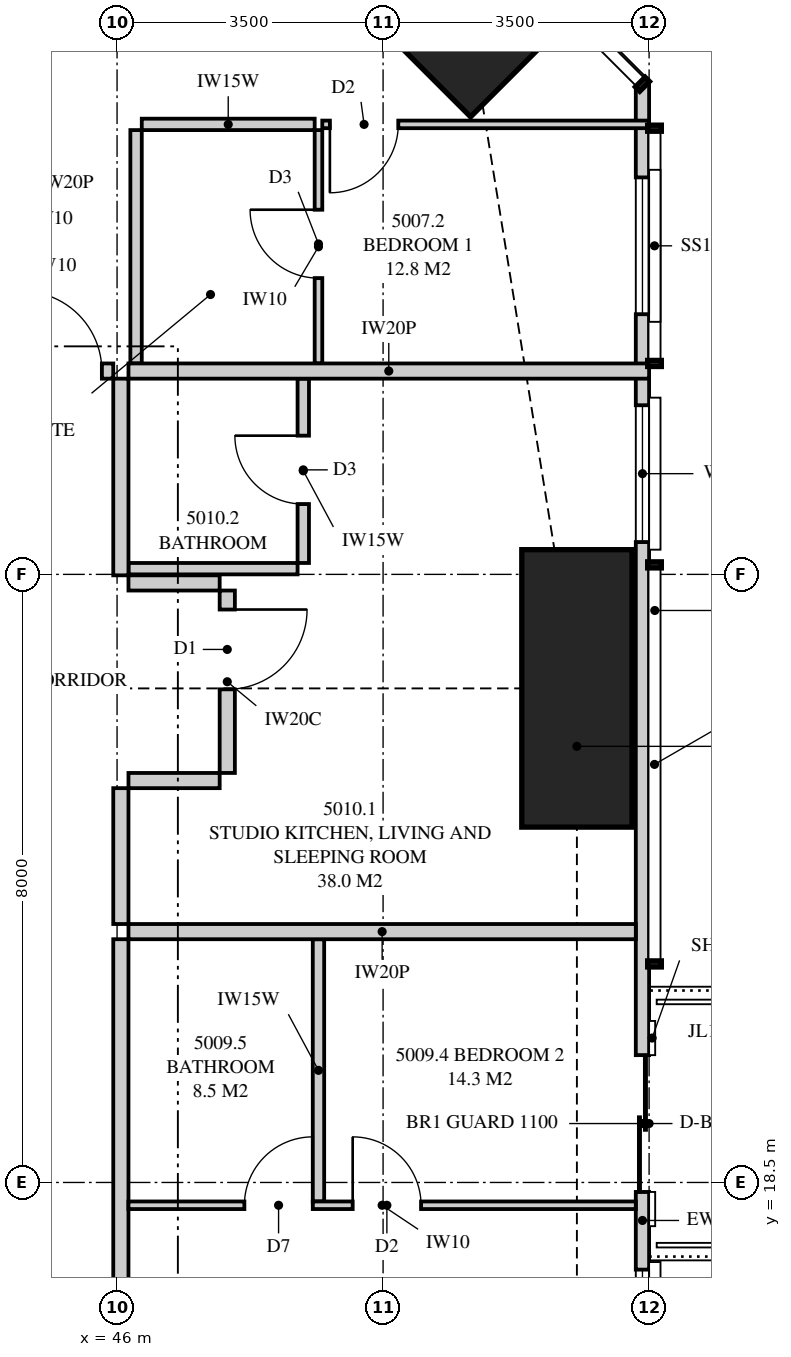
"""IFC4 building model, lengths in metres.
Left out: names, types, materials, properties, quantities, classifications, styles, units other than length and angle.
Written with IfcOpenShell. Run it as: python <this file> out.ifc"""

import sys

from ifc_helpers import new_model, si_unit, direction, frame, frame_2d, origin, origin_2d, place, context, subcontext, project, spatial, polyline, rectangle, outline, extrude, element, fill, save


model = new_model("IFC4")
c1 = context("Model", 3, precision=1e-05, world=origin(), true_north=direction((0.0, 1.0)))
c2 = subcontext(c1, "Body", "Model", "MODEL_VIEW")
j1 = project(units=[si_unit("LENGTHUNIT", "METRE"), si_unit("PLANEANGLEUNIT", "RADIAN")], contexts=[c1])
p1 = place(None, origin())
s1 = spatial("IfcSite", under=j1, at=p1, CompositionType="ELEMENT")
p2 = place(p1, origin())
s2 = spatial("IfcBuilding", under=s1, at=p2, CompositionType="ELEMENT")
p3 = place(p2, frame((0.0, 0.0, 184.5)))
s3 = spatial("IfcBuildingStorey", under=s2, at=p3, CompositionType="ELEMENT", Elevation=184.5)
p4 = place(p3, frame((52.05, 25.0, 0.0), z_axis=(0.0, 0.0, 1.0), x_axis=(1.0, 0.0, 0.0)))
e1 = element("IfcColumn", 1, at=p4, inside=s3, PredefinedType="COLUMN", context=c2, shape_type="SweptSolid", body=[
    extrude(rectangle(XDim=1.45, YDim=3.65, at=origin_2d()), origin(), (0.0, 0.0, 1.0), 3.35),
])
p5 = place(p3, frame((50.652, 33.652, 0.0), z_axis=(0.0, 0.0, 1.0), x_axis=(0.707106781187, 0.707106781187, 0.0)))
e2 = element("IfcColumn", 2, at=p5, inside=s3, PredefinedType="COLUMN", context=c2, shape_type="SweptSolid", body=[
    extrude(rectangle(XDim=1.6, YDim=1.6, at=origin_2d()), origin(), (0.0, 0.0, 1.0), 3.35),
])
p6 = place(p3, frame((52.913, 3.051, 0.0), z_axis=(0.0, 0.0, 1.0), x_axis=(0.0, 1.0, 0.0)))
e3 = element("IfcWall", 3, at=p6, inside=s3, PredefinedType="SOLIDWALL", context=c2, shape_type="SweptSolid", body=[
    extrude(outline(polyline([(0.0, 0.0), (29.897, 0.0), (29.897, 3.11), (22.167, 3.11), (22.167, 2.15), (22.074, 2.15), (22.074, 3.11), (21.949, 3.11), (21.949, 2.15), (9.949, 2.15), (9.949, 3.11), (9.847, 3.11), (9.847, 2.15), (9.706, 2.15), (9.706, 3.11), (0.0, 3.11), (0.0, 0.0)])), frame((0.0, 0.087, 0.0), z_axis=(0.0, -1.0, 0.0), x_axis=(1.0, 0.0, 0.0)), (0.0, 0.0, 1.0), 0.175),
])
p7 = place(p6, frame((1.137, 0.0, 0.4)))
e4 = element("IfcOpeningElement", 4, at=p7, cuts=e3, PredefinedType="OPENING", context=c2, shape_type="SweptSolid", body=[
    extrude(rectangle(XDim=2.4, YDim=1.7, at=frame_2d((1.2, 0.85))), frame((0.0, 0.097, 0.0), z_axis=(0.0, -1.0, 0.0), x_axis=(1.0, 0.0, 0.0)), (0.0, 0.0, 1.0), 0.195),
])
p8 = place(p6, frame((5.674, 0.0, 0.4)))
e5 = element("IfcOpeningElement", 5, at=p8, cuts=e3, PredefinedType="OPENING", context=c2, shape_type="SweptSolid", body=[
    extrude(rectangle(XDim=1.8, YDim=1.7, at=frame_2d((0.9, 0.85))), frame((0.0, 0.097, 0.0), z_axis=(0.0, -1.0, 0.0), x_axis=(1.0, 0.0, 0.0)), (0.0, 0.0, 1.0), 0.195),
])
p9 = place(p6, frame((11.902, 0.0, 0.4)))
e6 = element("IfcOpeningElement", 6, at=p9, cuts=e3, PredefinedType="OPENING", context=c2, shape_type="SweptSolid", body=[
    extrude(rectangle(XDim=2.4, YDim=1.7, at=frame_2d((1.2, 0.85))), frame((0.0, 0.097, 0.0), z_axis=(0.0, -1.0, 0.0), x_axis=(1.0, 0.0, 0.0)), (0.0, 0.0, 1.0), 0.195),
])
p10 = place(p6, frame((15.324, 0.0, 0.0)))
e7 = element("IfcOpeningElement", 7, at=p10, cuts=e3, PredefinedType="OPENING", context=c2, shape_type="SweptSolid", body=[
    extrude(rectangle(XDim=1.8, YDim=2.1, at=frame_2d((0.9, 1.05))), frame((0.0, 0.097, 0.0), z_axis=(0.0, -1.0, 0.0), x_axis=(1.0, 0.0, 0.0)), (0.0, 0.0, 1.0), 0.195),
])
p11 = place(p6, frame((23.874, 0.0, 0.4)))
e8 = element("IfcOpeningElement", 8, at=p11, cuts=e3, PredefinedType="OPENING", context=c2, shape_type="SweptSolid", body=[
    extrude(rectangle(XDim=1.8, YDim=1.7, at=frame_2d((0.9, 0.85))), frame((0.0, 0.097, 0.0), z_axis=(0.0, -1.0, 0.0), x_axis=(1.0, 0.0, 0.0)), (0.0, 0.0, 1.0), 0.195),
])
p12 = place(p6, frame((26.871, 0.0, 0.4)))
e9 = element("IfcOpeningElement", 9, at=p12, cuts=e3, PredefinedType="OPENING", context=c2, shape_type="SweptSolid", body=[
    extrude(rectangle(XDim=1.8, YDim=1.7, at=frame_2d((0.9, 0.85))), frame((0.0, 0.097, 0.0), z_axis=(0.0, -1.0, 0.0), x_axis=(1.0, 0.0, 0.0)), (0.0, 0.0, 1.0), 0.195),
])
p13 = place(p3, frame((42.05, 29.175, 0.0), z_axis=(0.0, 0.0, 1.0), x_axis=(1.0, 0.0, 0.0)))
e10 = element("IfcWall", 10, at=p13, inside=s3, PredefinedType="PARTITIONING", context=c2, shape_type="SweptSolid", body=[
    extrude(outline(polyline([(0.0, 0.0), (3.9, 0.0), (3.9, 3.11), (1.037, 3.11), (1.037, 2.541), (0.363, 2.541), (0.363, 3.11), (0.0, 3.11), (0.0, 0.0)])), frame((0.0, 0.1, 0.0), z_axis=(0.0, -1.0, 0.0), x_axis=(1.0, 0.0, 0.0)), (0.0, 0.0, 1.0), 0.2),
])
p14 = place(p13, frame((2.7, 0.0, 0.0)))
e11 = element("IfcOpeningElement", 11, at=p14, cuts=e10, PredefinedType="OPENING", context=c2, shape_type="SweptSolid", body=[
    extrude(rectangle(XDim=1.05, YDim=2.2, at=frame_2d((0.525, 1.1))), frame((0.0, 0.11, 0.0), z_axis=(0.0, -1.0, 0.0), x_axis=(1.0, 0.0, 0.0)), (0.0, 0.0, 1.0), 0.22),
])
p15 = place(p3, frame((48.65, 32.345, 0.0), z_axis=(0.0, 0.0, 1.0), x_axis=(0.0, -1.0, 0.0)))
e12 = element("IfcWall", 12, at=p15, inside=s3, PredefinedType="PARTITIONING", context=c2, shape_type="SweptSolid", body=[
    extrude(rectangle(XDim=3.07, YDim=0.1, at=frame_2d((1.535, 0.0))), origin(), (0.0, 0.0, 1.0), 3.11),
])
p16 = place(p15, frame((1.048, 0.0, 0.0)))
e13 = element("IfcOpeningElement", 13, at=p16, cuts=e12, PredefinedType="OPENING", context=c2, shape_type="SweptSolid", body=[
    extrude(rectangle(XDim=0.9, YDim=2.1, at=frame_2d((0.45, 1.05))), frame((0.0, 0.06, 0.0), z_axis=(0.0, -1.0, 0.0), x_axis=(1.0, 0.0, 0.0)), (0.0, 0.0, 1.0), 0.12),
])
p17 = place(p3, frame((48.7, 32.42, 0.0), z_axis=(0.0, 0.0, 1.0), x_axis=(1.0, 0.0, 0.0)))
e14 = element("IfcWall", 14, at=p17, inside=s3, PredefinedType="PARTITIONING", context=c2, shape_type="SweptSolid", body=[
    extrude(outline(polyline([(0.0, 0.0), (4.3, 0.0), (4.3, 3.11), (3.022, 3.11), (3.022, 2.15), (1.279, 2.15), (1.279, 3.11), (0.0, 3.11), (0.0, 0.0)])), frame((0.0, 0.05, 0.0), z_axis=(0.0, -1.0, 0.0), x_axis=(1.0, 0.0, 0.0)), (0.0, 0.0, 1.0), 0.1),
])
p18 = place(p17, frame((0.1, 0.0, 0.0)))
e15 = element("IfcOpeningElement", 15, at=p18, cuts=e14, PredefinedType="OPENING", context=c2, shape_type="SweptSolid", body=[
    extrude(rectangle(XDim=0.9, YDim=2.1, at=frame_2d((0.45, 1.05))), frame((0.0, 0.06, 0.0), z_axis=(0.0, -1.0, 0.0), x_axis=(1.0, 0.0, 0.0)), (0.0, 0.0, 1.0), 0.12),
])
p19 = place(p3, frame((46.325, 32.42, 0.0), z_axis=(0.0, 0.0, 1.0), x_axis=(1.0, 0.0, 0.0)))
e16 = element("IfcWall", 16, at=p19, inside=s3, PredefinedType="PLUMBINGWALL", context=c2, shape_type="SweptSolid", body=[
    extrude(rectangle(XDim=2.275, YDim=0.15, at=frame_2d((1.138, 0.0))), origin(), (0.0, 0.0, 1.0), 3.11),
])
p20 = place(p3, frame((46.25, 32.345, 0.0), z_axis=(0.0, 0.0, 1.0), x_axis=(0.0, -1.0, 0.0)))
e17 = element("IfcWall", 17, at=p20, inside=s3, PredefinedType="PLUMBINGWALL", context=c2, shape_type="SweptSolid", body=[
    extrude(rectangle(XDim=3.07, YDim=0.15, at=frame_2d((1.535, 0.0))), origin(), (0.0, 0.0, 1.0), 3.11),
])
p21 = place(p3, frame((46.15, 29.175, 0.0), z_axis=(0.0, 0.0, 1.0), x_axis=(1.0, 0.0, 0.0)))
e18 = element("IfcWall", 18, at=p21, inside=s3, PredefinedType="PARTITIONING", context=c2, shape_type="SweptSolid", body=[
    extrude(outline(polyline([(0.0, 0.0), (6.85, 0.0), (6.85, 3.11), (6.147, 3.11), (6.147, 2.15), (4.303, 2.15), (4.303, 3.11), (0.0, 3.11), (0.0, 0.0)])), frame((0.0, 0.1, 0.0), z_axis=(0.0, -1.0, 0.0), x_axis=(1.0, 0.0, 0.0)), (0.0, 0.0, 1.0), 0.2),
])
p22 = place(p3, frame((52.825, 21.8, 0.0), z_axis=(0.0, 0.0, 1.0), x_axis=(-1.0, 0.0, 0.0)))
e19 = element("IfcWall", 19, at=p22, inside=s3, PredefinedType="PARTITIONING", context=c2, shape_type="SweptSolid", body=[
    extrude(outline(polyline([(0.0, 0.0), (6.675, 0.0), (6.675, 3.11), (1.685, 3.11), (1.685, 2.15), (0.0, 2.15), (0.0, 3.11), (0.0, 0.0)])), frame((0.0, 0.1, 0.0), z_axis=(0.0, -1.0, 0.0), x_axis=(1.0, 0.0, 0.0)), (0.0, 0.0, 1.0), 0.2),
])
p23 = place(p3, frame((46.05, 7.925, 0.0), z_axis=(0.0, 0.0, 1.0), x_axis=(0.0, 1.0, 0.0)))
e20 = element("IfcWall", 20, at=p23, inside=s3, PredefinedType="PARTITIONING", context=c2, shape_type="SweptSolid", body=[
    extrude(outline(polyline([(0.0, 0.0), (13.775, 0.0), (13.775, 3.11), (5.412, 3.11), (5.412, 2.541), (4.738, 2.541), (4.738, 3.11), (0.0, 3.11), (0.0, 0.0)])), frame((0.0, 0.1, 0.0), z_axis=(0.0, -1.0, 0.0), x_axis=(1.0, 0.0, 0.0)), (0.0, 0.0, 1.0), 0.2),
])
p24 = place(p23, frame((6.387, 0.0, 0.0)))
e21 = element("IfcOpeningElement", 21, at=p24, cuts=e20, PredefinedType="OPENING", context=c2, shape_type="SweptSolid", body=[
    extrude(rectangle(XDim=1.05, YDim=2.2, at=frame_2d((0.525, 1.1))), frame((0.0, 0.11, 0.0), z_axis=(0.0, -1.0, 0.0), x_axis=(1.0, 0.0, 0.0)), (0.0, 0.0, 1.0), 0.22),
])
p25 = place(p3, frame((52.825, 18.2, 0.0), z_axis=(0.0, 0.0, 1.0), x_axis=(-1.0, 0.0, 0.0)))
e22 = element("IfcWall", 22, at=p25, inside=s3, PredefinedType="PARTITIONING", context=c2, shape_type="SweptSolid", body=[
    extrude(outline(polyline([(0.0, 0.0), (6.675, 0.0), (6.675, 3.11), (1.635, 3.11), (1.635, 2.15), (0.0, 2.15), (0.0, 3.11), (0.0, 0.0)])), frame((0.0, 0.05, 0.0), z_axis=(0.0, -1.0, 0.0), x_axis=(1.0, 0.0, 0.0)), (0.0, 0.0, 1.0), 0.1),
])
p26 = place(p25, frame((2.825, 0.0, 0.0)))
e23 = element("IfcOpeningElement", 23, at=p26, cuts=e22, PredefinedType="OPENING", context=c2, shape_type="SweptSolid", body=[
    extrude(rectangle(XDim=0.9, YDim=2.1, at=frame_2d((0.45, 1.05))), frame((0.0, 0.06, 0.0), z_axis=(0.0, -1.0, 0.0), x_axis=(1.0, 0.0, 0.0)), (0.0, 0.0, 1.0), 0.12),
])
p27 = place(p25, frame((4.25, 0.0, 0.0)))
e24 = element("IfcOpeningElement", 24, at=p27, cuts=e22, PredefinedType="OPENING", context=c2, shape_type="SweptSolid", body=[
    extrude(rectangle(XDim=0.9, YDim=2.1, at=frame_2d((0.45, 1.05))), frame((0.0, 0.06, 0.0), z_axis=(0.0, -1.0, 0.0), x_axis=(1.0, 0.0, 0.0)), (0.0, 0.0, 1.0), 0.12),
])
p28 = place(p3, frame((48.65, 18.25, 0.0), z_axis=(0.0, 0.0, 1.0), x_axis=(0.0, 1.0, 0.0)))
e25 = element("IfcWall", 25, at=p28, inside=s3, PredefinedType="PLUMBINGWALL", context=c2, shape_type="SweptSolid", body=[
    extrude(rectangle(XDim=3.45, YDim=0.15, at=frame_2d((1.725, 0.0))), origin(), (0.0, 0.0, 1.0), 3.11),
])
p29 = place(p3, frame((46.05, 21.9, 0.0), z_axis=(0.0, 0.0, 1.0), x_axis=(0.0, 1.0, 0.0)))
e26 = element("IfcWall", 26, at=p29, inside=s3, PredefinedType="PARTITIONING", context=c2, shape_type="SweptSolid", body=[
    extrude(rectangle(XDim=1.788, YDim=0.2, at=frame_2d((0.894, 0.0))), origin(), (0.0, 0.0, 1.0), 3.11),
])
p30 = place(p3, frame((48.45, 26.65, 0.0), z_axis=(0.0, 0.0, 1.0), x_axis=(0.0, 1.0, 0.0)))
e27 = element("IfcWall", 27, at=p30, inside=s3, PredefinedType="PLUMBINGWALL", context=c2, shape_type="SweptSolid", body=[
    extrude(rectangle(XDim=2.425, YDim=0.15, at=frame_2d((1.212, 0.0))), origin(), (0.0, 0.0, 1.0), 3.11),
])
p31 = place(p30, frame((0.775, 0.0, 0.0)))
e28 = element("IfcOpeningElement", 28, at=p31, cuts=e27, PredefinedType="OPENING", context=c2, shape_type="SweptSolid", body=[
    extrude(rectangle(XDim=0.9, YDim=2.1, at=frame_2d((0.45, 1.05))), frame((0.0, 0.085, 0.0), z_axis=(0.0, -1.0, 0.0), x_axis=(1.0, 0.0, 0.0)), (0.0, 0.0, 1.0), 0.17),
])
p32 = place(p3, frame((48.375, 26.575, 0.0), z_axis=(0.0, 0.0, 1.0), x_axis=(-1.0, 0.0, 0.0)))
e29 = element("IfcWall", 29, at=p32, inside=s3, PredefinedType="PLUMBINGWALL", context=c2, shape_type="SweptSolid", body=[
    extrude(rectangle(XDim=2.225, YDim=0.15, at=frame_2d((1.113, 0.0))), origin(), (0.0, 0.0, 1.0), 3.11),
])
p33 = place(p3, frame((46.05, 26.488, 0.0), z_axis=(0.0, 0.0, 1.0), x_axis=(0.0, 1.0, 0.0)))
e30 = element("IfcWall", 30, at=p33, inside=s3, PredefinedType="PARTITIONING", context=c2, shape_type="SweptSolid", body=[
    extrude(rectangle(XDim=2.587, YDim=0.2, at=frame_2d((1.294, 0.0))), origin(), (0.0, 0.0, 1.0), 3.11),
])
p34 = place(p3, frame((47.45, 23.887, 0.0), z_axis=(0.0, 0.0, 1.0), x_axis=(0.0, 1.0, 0.0)))
e31 = element("IfcWall", 31, at=p34, inside=s3, PredefinedType="PARTITIONING", context=c2, shape_type="SweptSolid", body=[
    extrude(outline(polyline([(0.0, 0.0), (2.4, 0.0), (2.4, 3.11), (1.45, 3.11), (1.45, 2.541), (0.775, 2.541), (0.775, 3.11), (0.0, 3.11), (0.0, 0.0)])), frame((0.0, 0.1, 0.0), z_axis=(0.0, -1.0, 0.0), x_axis=(1.0, 0.0, 0.0)), (0.0, 0.0, 1.0), 0.2),
])
p35 = place(p34, frame((1.1, 0.0, 0.0)))
e32 = element("IfcOpeningElement", 32, at=p35, cuts=e31, PredefinedType="OPENING", context=c2, shape_type="SweptSolid", body=[
    extrude(rectangle(XDim=1.05, YDim=2.2, at=frame_2d((0.525, 1.1))), frame((0.0, 0.11, 0.0), z_axis=(0.0, -1.0, 0.0), x_axis=(1.0, 0.0, 0.0)), (0.0, 0.0, 1.0), 0.22),
])
for number, where, z_axis, x_axis in (
    (33, (46.15, 23.788, 0.0), (0.0, 0.0, 1.0), (1.0, 0.0, 0.0)),
    (34, (46.15, 26.387, 0.0), (0.0, 0.0, 1.0), (1.0, 0.0, 0.0)),
):
    element("IfcWall", number, at=place(p3, frame(where, z_axis=z_axis, x_axis=x_axis)), inside=s3, PredefinedType="PARTITIONING", context=c2, shape_type="SweptSolid", body=[
        extrude(rectangle(XDim=1.2, YDim=0.2, at=frame_2d((0.6, 0.0))), origin(), (0.0, 0.0, 1.0), 3.11),
    ])
p36 = place(p9, origin())
e35 = element("IfcWindow", 35, at=p36, inside=s3, PartitioningType="SINGLE_PANEL", PredefinedType="WINDOW", context=c2, shape_type="SweptSolid", body=[
    extrude(rectangle(XDim=2.4, YDim=1.7, at=frame_2d((1.2, 0.85))), frame((0.0, 0.03, 0.0), z_axis=(0.0, -1.0, 0.0), x_axis=(1.0, 0.0, 0.0)), (0.0, 0.0, 1.0), 0.06),
])
fill(e6, e35)
p37 = place(p10, origin())
e36 = element("IfcDoor", 36, at=p37, inside=s3, OperationType="SLIDING_TO_LEFT", PredefinedType="DOOR", context=c2, shape_type="SweptSolid", body=[
    extrude(rectangle(XDim=1.8, YDim=2.1, at=frame_2d((0.9, 1.05))), frame((0.0, 0.025, 0.0), z_axis=(0.0, -1.0, 0.0), x_axis=(1.0, 0.0, 0.0)), (0.0, 0.0, 1.0), 0.05),
])
fill(e7, e36)
p38 = place(p11, origin())
e37 = element("IfcWindow", 37, at=p38, inside=s3, PartitioningType="SINGLE_PANEL", PredefinedType="WINDOW", context=c2, shape_type="SweptSolid", body=[
    extrude(rectangle(XDim=1.8, YDim=1.7, at=frame_2d((0.9, 0.85))), frame((0.0, 0.03, 0.0), z_axis=(0.0, -1.0, 0.0), x_axis=(1.0, 0.0, 0.0)), (0.0, 0.0, 1.0), 0.06),
])
fill(e8, e37)
p39 = place(p12, origin())
e38 = element("IfcWindow", 38, at=p39, inside=s3, PartitioningType="SINGLE_PANEL", PredefinedType="WINDOW", context=c2, shape_type="SweptSolid", body=[
    extrude(rectangle(XDim=1.8, YDim=1.7, at=frame_2d((0.9, 0.85))), frame((0.0, 0.03, 0.0), z_axis=(0.0, -1.0, 0.0), x_axis=(1.0, 0.0, 0.0)), (0.0, 0.0, 1.0), 0.06),
])
fill(e9, e38)
p40 = place(p14, origin())
e39 = element("IfcDoor", 39, at=p40, inside=s3, OperationType="SINGLE_SWING_LEFT", PredefinedType="DOOR", context=c2, shape_type="SweptSolid", body=[
    extrude(rectangle(XDim=1.05, YDim=2.2, at=frame_2d((0.525, 1.1))), frame((0.0, 0.025, 0.0), z_axis=(0.0, -1.0, 0.0), x_axis=(1.0, 0.0, 0.0)), (0.0, 0.0, 1.0), 0.05),
])
fill(e11, e39)
p41 = place(p18, frame((0.9, 0.0, 0.0), z_axis=(0.0, 0.0, 1.0), x_axis=(-1.0, 0.0, 0.0)))
e40 = element("IfcDoor", 40, at=p41, inside=s3, OperationType="SINGLE_SWING_RIGHT", PredefinedType="DOOR", context=c2, shape_type="SweptSolid", body=[
    extrude(rectangle(XDim=0.9, YDim=2.1, at=frame_2d((0.45, 1.05))), frame((0.0, 0.025, 0.0), z_axis=(0.0, -1.0, 0.0), x_axis=(1.0, 0.0, 0.0)), (0.0, 0.0, 1.0), 0.05),
])
fill(e15, e40)
p42 = place(p16, frame((0.9, 0.0, 0.0), z_axis=(0.0, 0.0, 1.0), x_axis=(-1.0, 0.0, 0.0)))
e41 = element("IfcDoor", 41, at=p42, inside=s3, OperationType="SINGLE_SWING_RIGHT", PredefinedType="DOOR", context=c2, shape_type="SweptSolid", body=[
    extrude(rectangle(XDim=0.9, YDim=2.1, at=frame_2d((0.45, 1.05))), frame((0.0, 0.025, 0.0), z_axis=(0.0, -1.0, 0.0), x_axis=(1.0, 0.0, 0.0)), (0.0, 0.0, 1.0), 0.05),
])
fill(e13, e41)
p43 = place(p26, frame((0.9, 0.0, 0.0), z_axis=(0.0, 0.0, 1.0), x_axis=(-1.0, 0.0, 0.0)))
e42 = element("IfcDoor", 42, at=p43, inside=s3, OperationType="SINGLE_SWING_LEFT", PredefinedType="DOOR", context=c2, shape_type="SweptSolid", body=[
    extrude(rectangle(XDim=0.9, YDim=2.1, at=frame_2d((0.45, 1.05))), frame((0.0, 0.025, 0.0), z_axis=(0.0, -1.0, 0.0), x_axis=(1.0, 0.0, 0.0)), (0.0, 0.0, 1.0), 0.05),
])
fill(e23, e42)
p44 = place(p27, frame((0.9, 0.0, 0.0), z_axis=(0.0, 0.0, 1.0), x_axis=(-1.0, 0.0, 0.0)))
e43 = element("IfcDoor", 43, at=p44, inside=s3, OperationType="SINGLE_SWING_RIGHT", PredefinedType="DOOR", context=c2, shape_type="SweptSolid", body=[
    extrude(rectangle(XDim=0.9, YDim=2.1, at=frame_2d((0.45, 1.05))), frame((0.0, 0.025, 0.0), z_axis=(0.0, -1.0, 0.0), x_axis=(1.0, 0.0, 0.0)), (0.0, 0.0, 1.0), 0.05),
])
fill(e24, e43)
p45 = place(p35, frame((1.05, 0.0, 0.0), z_axis=(0.0, 0.0, 1.0), x_axis=(-1.0, 0.0, 0.0)))
e44 = element("IfcDoor", 44, at=p45, inside=s3, OperationType="SINGLE_SWING_LEFT", PredefinedType="DOOR", context=c2, shape_type="SweptSolid", body=[
    extrude(rectangle(XDim=1.05, YDim=2.2, at=frame_2d((0.525, 1.1))), frame((0.0, 0.025, 0.0), z_axis=(0.0, -1.0, 0.0), x_axis=(1.0, 0.0, 0.0)), (0.0, 0.0, 1.0), 0.05),
])
fill(e32, e44)
p46 = place(p31, origin())
e45 = element("IfcDoor", 45, at=p46, inside=s3, OperationType="SINGLE_SWING_RIGHT", PredefinedType="DOOR", context=c2, shape_type="SweptSolid", body=[
    extrude(rectangle(XDim=0.9, YDim=2.1, at=frame_2d((0.45, 1.05))), frame((0.0, 0.025, 0.0), z_axis=(0.0, -1.0, 0.0), x_axis=(1.0, 0.0, 0.0)), (0.0, 0.0, 1.0), 0.05),
])
fill(e28, e45)
save(model, sys.argv[1])
